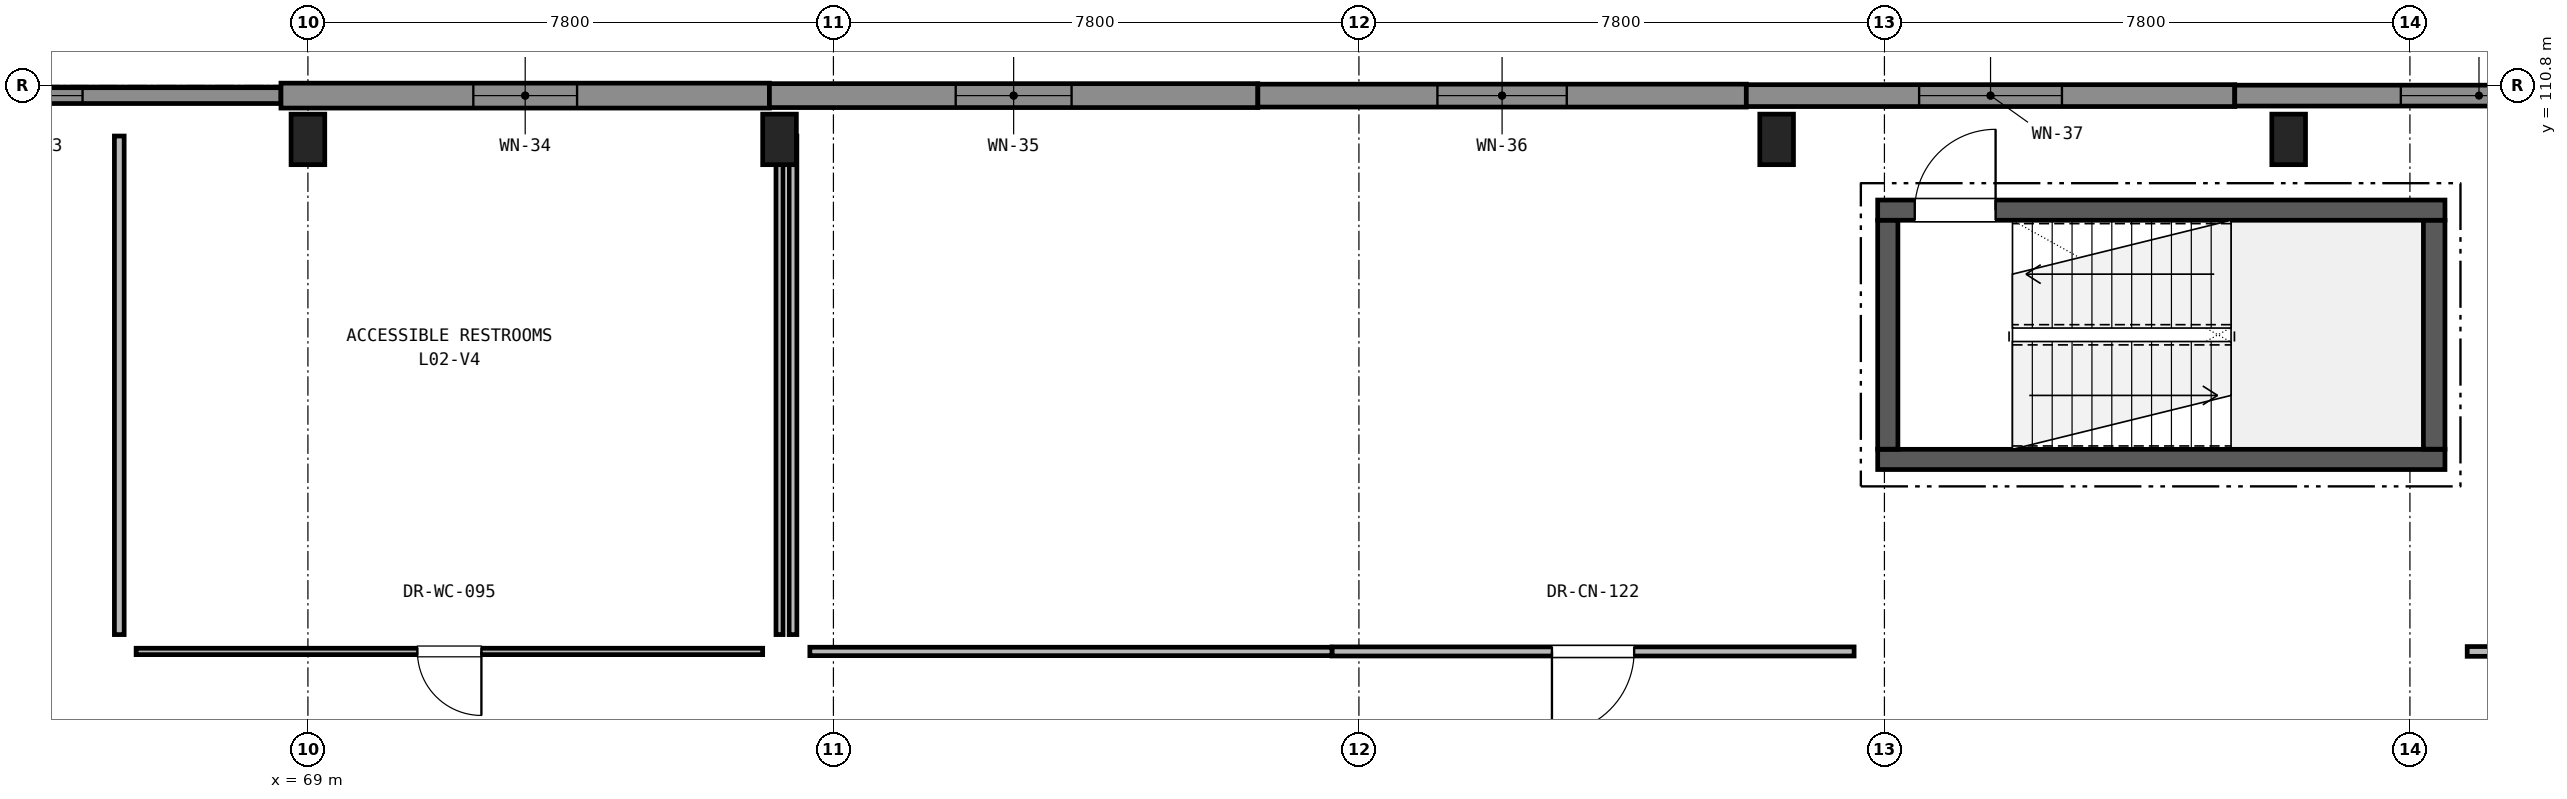
"""IFC4 building model, lengths in metres.
Left out: names, types, materials, properties, quantities, classifications, styles, units other than length and angle.
Written with IfcOpenShell. Run it as: python <this file> out.ifc"""

import sys

from ifc_helpers import new_model, si_unit, direction, frame, frame_2d, origin, origin_2d, place, context, subcontext, project, spatial, rectangle, extrude, element, fill, save


model = new_model("IFC4")
c1 = context("Model", 3, precision=1e-05, world=origin(), true_north=direction((0.0, 1.0)))
c2 = subcontext(c1, "Body", "Model", "MODEL_VIEW")
j1 = project(units=[si_unit("LENGTHUNIT", "METRE"), si_unit("PLANEANGLEUNIT", "RADIAN")], contexts=[c1])
p1 = place(None, origin())
s1 = spatial("IfcSite", under=j1, at=p1, CompositionType="ELEMENT")
p2 = place(p1, origin())
s2 = spatial("IfcBuilding", under=s1, at=p2, CompositionType="ELEMENT")
p3 = place(p2, frame((0.0, 0.0, 9.52)))
s3 = spatial("IfcBuildingStorey", under=s2, at=p3, CompositionType="ELEMENT", Elevation=9.52)
for number, where, z_axis, x_axis in (
    (1, (69.0, 110.0, 0.0), (0.0, 0.0, 1.0), (1.0, 0.0, 0.0)),
    (2, (76.0, 110.0, 0.0), (0.0, 0.0, 1.0), (1.0, 0.0, 0.0)),
    (3, (90.8, 110.0, 0.0), (0.0, 0.0, 1.0), (1.0, 0.0, 0.0)),
    (4, (98.4, 110.0, 0.0), (0.0, 0.0, 1.0), (1.0, 0.0, 0.0)),
):
    element("IfcColumn", number, at=place(p3, frame(where, z_axis=z_axis, x_axis=x_axis)), inside=s3, PredefinedType="COLUMN", context=c2, shape_type="SweptSolid", body=[
        extrude(rectangle(XDim=0.5, YDim=0.75, at=origin_2d()), origin(), (0.0, 0.0, 1.0), 4.08),
    ])
p4 = place(p3, frame((61.35, 110.65, 0.0), z_axis=(0.0, 0.0, 1.0), x_axis=(1.0, 0.0, 0.0)))
e5 = element("IfcWall", 5, at=p4, inside=s3, PredefinedType="SOLIDWALL", context=c2, shape_type="SweptSolid", body=[
    extrude(rectangle(XDim=7.25, YDim=0.235, at=frame_2d((3.625, 0.0))), origin(), (0.0, 0.0, 1.0), 3.82),
])
p5 = place(p4, frame((2.945, 0.0, 0.9)))
e6 = element("IfcOpeningElement", 6, at=p5, cuts=e5, PredefinedType="OPENING", context=c2, shape_type="SweptSolid", body=[
    extrude(rectangle(XDim=1.36, YDim=1.62, at=frame_2d((0.68, 0.81))), frame((0.0, 0.127, 0.0), z_axis=(0.0, -1.0, 0.0), x_axis=(1.0, 0.0, 0.0)), (0.0, 0.0, 1.0), 0.255),
])
p6 = place(p3, frame((68.6, 110.65, 0.0), z_axis=(0.0, 0.0, 1.0), x_axis=(1.0, 0.0, 0.0)))
e7 = element("IfcWall", 7, at=p6, inside=s3, PredefinedType="SOLIDWALL", context=c2, shape_type="SweptSolid", body=[
    extrude(rectangle(XDim=7.25, YDim=0.37, at=frame_2d((3.625, 0.0))), origin(), (0.0, 0.0, 1.0), 3.82),
])
p7 = place(p6, frame((2.855, 0.0, 0.9)))
e8 = element("IfcOpeningElement", 8, at=p7, cuts=e7, PredefinedType="OPENING", context=c2, shape_type="SweptSolid", body=[
    extrude(rectangle(XDim=1.54, YDim=1.62, at=frame_2d((0.77, 0.81))), frame((0.0, 0.195, 0.0), z_axis=(0.0, -1.0, 0.0), x_axis=(1.0, 0.0, 0.0)), (0.0, 0.0, 1.0), 0.39),
])
p8 = place(p3, frame((75.85, 110.65, 0.0), z_axis=(0.0, 0.0, 1.0), x_axis=(1.0, 0.0, 0.0)))
e9 = element("IfcWall", 9, at=p8, inside=s3, PredefinedType="SOLIDWALL", context=c2, shape_type="SweptSolid", body=[
    extrude(rectangle(XDim=7.25, YDim=0.355, at=frame_2d((3.625, 0.0))), origin(), (0.0, 0.0, 1.0), 3.82),
])
p9 = place(p8, frame((2.765, 0.0, 0.9)))
e10 = element("IfcOpeningElement", 10, at=p9, cuts=e9, PredefinedType="OPENING", context=c2, shape_type="SweptSolid", body=[
    extrude(rectangle(XDim=1.72, YDim=1.62, at=frame_2d((0.86, 0.81))), frame((0.0, 0.188, 0.0), z_axis=(0.0, -1.0, 0.0), x_axis=(1.0, 0.0, 0.0)), (0.0, 0.0, 1.0), 0.375),
])
p10 = place(p3, frame((83.1, 110.65, 0.0), z_axis=(0.0, 0.0, 1.0), x_axis=(1.0, 0.0, 0.0)))
e11 = element("IfcWall", 11, at=p10, inside=s3, PredefinedType="SOLIDWALL", context=c2, shape_type="SweptSolid", body=[
    extrude(rectangle(XDim=7.25, YDim=0.34, at=frame_2d((3.625, 0.0))), origin(), (0.0, 0.0, 1.0), 3.82),
])
p11 = place(p10, frame((2.665, 0.0, 0.9)))
e12 = element("IfcOpeningElement", 12, at=p11, cuts=e11, PredefinedType="OPENING", context=c2, shape_type="SweptSolid", body=[
    extrude(rectangle(XDim=1.92, YDim=1.62, at=frame_2d((0.96, 0.81))), frame((0.0, 0.18, 0.0), z_axis=(0.0, -1.0, 0.0), x_axis=(1.0, 0.0, 0.0)), (0.0, 0.0, 1.0), 0.36),
])
p12 = place(p3, frame((90.35, 110.65, 0.0), z_axis=(0.0, 0.0, 1.0), x_axis=(1.0, 0.0, 0.0)))
e13 = element("IfcWall", 13, at=p12, inside=s3, PredefinedType="SOLIDWALL", context=c2, shape_type="SweptSolid", body=[
    extrude(rectangle(XDim=7.25, YDim=0.325, at=frame_2d((3.625, 0.0))), origin(), (0.0, 0.0, 1.0), 3.82),
])
p13 = place(p12, frame((2.565, 0.0, 0.9)))
e14 = element("IfcOpeningElement", 14, at=p13, cuts=e13, PredefinedType="OPENING", context=c2, shape_type="SweptSolid", body=[
    extrude(rectangle(XDim=2.12, YDim=1.62, at=frame_2d((1.06, 0.81))), frame((0.0, 0.172, 0.0), z_axis=(0.0, -1.0, 0.0), x_axis=(1.0, 0.0, 0.0)), (0.0, 0.0, 1.0), 0.345),
])
p14 = place(p3, frame((97.6, 110.65, 0.0), z_axis=(0.0, 0.0, 1.0), x_axis=(1.0, 0.0, 0.0)))
e15 = element("IfcWall", 15, at=p14, inside=s3, PredefinedType="SOLIDWALL", context=c2, shape_type="SweptSolid", body=[
    extrude(rectangle(XDim=7.25, YDim=0.31, at=frame_2d((3.625, 0.0))), origin(), (0.0, 0.0, 1.0), 3.82),
])
p15 = place(p14, frame((2.465, 0.0, 0.9)))
e16 = element("IfcOpeningElement", 16, at=p15, cuts=e15, PredefinedType="OPENING", context=c2, shape_type="SweptSolid", body=[
    extrude(rectangle(XDim=2.32, YDim=1.62, at=frame_2d((1.16, 0.81))), frame((0.0, 0.165, 0.0), z_axis=(0.0, -1.0, 0.0), x_axis=(1.0, 0.0, 0.0)), (0.0, 0.0, 1.0), 0.33),
])
p16 = place(p3, frame((92.3, 105.25, 0.0), z_axis=(0.0, 0.0, 1.0), x_axis=(1.0, 0.0, 0.0)))
e17 = element("IfcWall", 17, at=p16, inside=s3, PredefinedType="SHEAR", context=c2, shape_type="SweptSolid", body=[
    extrude(rectangle(XDim=8.42, YDim=0.3, at=frame_2d((4.21, 0.0))), origin(), (0.0, 0.0, 1.0), 3.82),
])
p17 = place(p3, frame((92.3, 108.95, 0.0), z_axis=(0.0, 0.0, 1.0), x_axis=(1.0, 0.0, 0.0)))
e18 = element("IfcWall", 18, at=p17, inside=s3, PredefinedType="SHEAR", context=c2, shape_type="SweptSolid", body=[
    extrude(rectangle(XDim=8.42, YDim=0.3, at=frame_2d((4.21, 0.0))), origin(), (0.0, 0.0, 1.0), 3.82),
])
p18 = place(p17, frame((0.55, 0.0, 0.0)))
e19 = element("IfcOpeningElement", 19, at=p18, cuts=e18, PredefinedType="OPENING", context=c2, shape_type="SweptSolid", body=[
    extrude(rectangle(XDim=1.2, YDim=2.2, at=frame_2d((0.6, 1.1))), frame((0.0, 0.16, 0.0), z_axis=(0.0, -1.0, 0.0), x_axis=(1.0, 0.0, 0.0)), (0.0, 0.0, 1.0), 0.32),
])
p19 = place(p3, frame((92.45, 105.402, 0.0), z_axis=(0.0, 0.0, 1.0), x_axis=(0.0, 1.0, 0.0)))
e20 = element("IfcWall", 20, at=p19, inside=s3, PredefinedType="SHEAR", context=c2, shape_type="SweptSolid", body=[
    extrude(rectangle(XDim=3.396, YDim=0.3, at=frame_2d((1.698, 0.0))), origin(), (0.0, 0.0, 1.0), 3.82),
])
p20 = place(p3, frame((100.56, 105.402, 0.0), z_axis=(0.0, 0.0, 1.0), x_axis=(0.0, 1.0, 0.0)))
e21 = element("IfcWall", 21, at=p20, inside=s3, PredefinedType="SHEAR", context=c2, shape_type="SweptSolid", body=[
    extrude(rectangle(XDim=3.396, YDim=0.32, at=frame_2d((1.698, 0.0))), origin(), (0.0, 0.0, 1.0), 3.82),
])
p21 = place(p3, frame((76.0, 110.05, 0.0), z_axis=(0.0, 0.0, 1.0), x_axis=(0.0, -1.0, 0.0)))
e22 = element("IfcWall", 22, at=p21, inside=s3, PredefinedType="PARTITIONING", context=c2, shape_type="SweptSolid", body=[
    extrude(rectangle(XDim=7.4, YDim=0.105, at=frame_2d((3.7, 0.0))), origin(), (0.0, 0.0, 1.0), 3.17),
])
p22 = place(p3, frame((75.75, 102.4, 0.0), z_axis=(0.0, 0.0, 1.0), x_axis=(-1.0, 0.0, 0.0)))
e23 = element("IfcWall", 23, at=p22, inside=s3, PredefinedType="PARTITIONING", context=c2, shape_type="SweptSolid", body=[
    extrude(rectangle(XDim=9.3, YDim=0.095, at=frame_2d((4.65, 0.0))), origin(), (0.0, 0.0, 1.0), 3.07),
])
p23 = place(p22, frame((4.175, 0.0, 0.0)))
e24 = element("IfcOpeningElement", 24, at=p23, cuts=e23, PredefinedType="OPENING", context=c2, shape_type="SweptSolid", body=[
    extrude(rectangle(XDim=0.95, YDim=2.15, at=frame_2d((0.475, 1.075))), frame((0.0, 0.057, 0.0), z_axis=(0.0, -1.0, 0.0), x_axis=(1.0, 0.0, 0.0)), (0.0, 0.0, 1.0), 0.115),
])
p24 = place(p3, frame((66.2, 102.65, 0.0), z_axis=(0.0, 0.0, 1.0), x_axis=(0.0, 1.0, 0.0)))
e25 = element("IfcWall", 25, at=p24, inside=s3, PredefinedType="PARTITIONING", context=c2, shape_type="SweptSolid", body=[
    extrude(rectangle(XDim=7.4, YDim=0.145, at=frame_2d((3.7, 0.0))), origin(), (0.0, 0.0, 1.0), 3.27),
])
p25 = place(p3, frame((91.95, 102.4, 0.0), z_axis=(0.0, 0.0, 1.0), x_axis=(-1.0, 0.0, 0.0)))
e26 = element("IfcWall", 26, at=p25, inside=s3, PredefinedType="PARTITIONING", context=c2, shape_type="SweptSolid", body=[
    extrude(rectangle(XDim=7.75, YDim=0.135, at=frame_2d((3.875, 0.0))), origin(), (0.0, 0.0, 1.0), 3.27),
])
p26 = place(p25, frame((3.265, 0.0, 0.0)))
e27 = element("IfcOpeningElement", 27, at=p26, cuts=e26, PredefinedType="OPENING", context=c2, shape_type="SweptSolid", body=[
    extrude(rectangle(XDim=1.22, YDim=2.2, at=frame_2d((0.61, 1.1))), frame((0.0, 0.077, 0.0), z_axis=(0.0, -1.0, 0.0), x_axis=(1.0, 0.0, 0.0)), (0.0, 0.0, 1.0), 0.155),
])
p27 = place(p3, frame((84.2, 102.4, 0.0), z_axis=(0.0, 0.0, 1.0), x_axis=(-1.0, 0.0, 0.0)))
e28 = element("IfcWall", 28, at=p27, inside=s3, PredefinedType="PARTITIONING", context=c2, shape_type="SweptSolid", body=[
    extrude(rectangle(XDim=7.75, YDim=0.125, at=frame_2d((3.875, 0.0))), origin(), (0.0, 0.0, 1.0), 3.82),
])
p28 = place(p3, frame((76.2, 102.65, 0.0), z_axis=(0.0, 0.0, 1.0), x_axis=(0.0, 1.0, 0.0)))
e29 = element("IfcWall", 29, at=p28, inside=s3, PredefinedType="PARTITIONING", context=c2, shape_type="SweptSolid", body=[
    extrude(rectangle(XDim=7.4, YDim=0.115, at=frame_2d((3.7, 0.0))), origin(), (0.0, 0.0, 1.0), 3.17),
])
p29 = place(p3, frame((106.483, 102.4, 0.0), z_axis=(0.0, 0.0, 1.0), x_axis=(-1.0, 0.0, 0.0)))
e30 = element("IfcWall", 30, at=p29, inside=s3, PredefinedType="PARTITIONING", context=c2, shape_type="SweptSolid", body=[
    extrude(rectangle(XDim=5.433, YDim=0.145, at=frame_2d((2.716, 0.0))), origin(), (0.0, 0.0, 1.0), 3.22),
])
p30 = place(p5, origin())
e31 = element("IfcWindow", 31, at=p30, inside=s3, PartitioningType="SINGLE_PANEL", PredefinedType="WINDOW", context=c2, shape_type="SweptSolid", body=[
    extrude(rectangle(XDim=1.36, YDim=1.62, at=frame_2d((0.68, 0.81))), frame((0.0, 0.03, 0.0), z_axis=(0.0, -1.0, 0.0), x_axis=(1.0, 0.0, 0.0)), (0.0, 0.0, 1.0), 0.06),
])
fill(e6, e31)
p31 = place(p7, origin())
e32 = element("IfcWindow", 32, at=p31, inside=s3, PartitioningType="SINGLE_PANEL", PredefinedType="WINDOW", context=c2, shape_type="SweptSolid", body=[
    extrude(rectangle(XDim=1.54, YDim=1.62, at=frame_2d((0.77, 0.81))), frame((0.0, 0.03, 0.0), z_axis=(0.0, -1.0, 0.0), x_axis=(1.0, 0.0, 0.0)), (0.0, 0.0, 1.0), 0.06),
])
fill(e8, e32)
p32 = place(p9, origin())
e33 = element("IfcWindow", 33, at=p32, inside=s3, PartitioningType="SINGLE_PANEL", PredefinedType="WINDOW", context=c2, shape_type="SweptSolid", body=[
    extrude(rectangle(XDim=1.72, YDim=1.62, at=frame_2d((0.86, 0.81))), frame((0.0, 0.03, 0.0), z_axis=(0.0, -1.0, 0.0), x_axis=(1.0, 0.0, 0.0)), (0.0, 0.0, 1.0), 0.06),
])
fill(e10, e33)
p33 = place(p11, origin())
e34 = element("IfcWindow", 34, at=p33, inside=s3, PartitioningType="SINGLE_PANEL", PredefinedType="WINDOW", context=c2, shape_type="SweptSolid", body=[
    extrude(rectangle(XDim=1.92, YDim=1.62, at=frame_2d((0.96, 0.81))), frame((0.0, 0.03, 0.0), z_axis=(0.0, -1.0, 0.0), x_axis=(1.0, 0.0, 0.0)), (0.0, 0.0, 1.0), 0.06),
])
fill(e12, e34)
p34 = place(p13, origin())
e35 = element("IfcWindow", 35, at=p34, inside=s3, PartitioningType="SINGLE_PANEL", PredefinedType="WINDOW", context=c2, shape_type="SweptSolid", body=[
    extrude(rectangle(XDim=2.12, YDim=1.62, at=frame_2d((1.06, 0.81))), frame((0.0, 0.03, 0.0), z_axis=(0.0, -1.0, 0.0), x_axis=(1.0, 0.0, 0.0)), (0.0, 0.0, 1.0), 0.06),
])
fill(e14, e35)
p35 = place(p15, origin())
e36 = element("IfcWindow", 36, at=p35, inside=s3, PartitioningType="SINGLE_PANEL", PredefinedType="WINDOW", context=c2, shape_type="SweptSolid", body=[
    extrude(rectangle(XDim=2.32, YDim=1.62, at=frame_2d((1.16, 0.81))), frame((0.0, 0.03, 0.0), z_axis=(0.0, -1.0, 0.0), x_axis=(1.0, 0.0, 0.0)), (0.0, 0.0, 1.0), 0.06),
])
fill(e16, e36)
p36 = place(p18, origin())
e37 = element("IfcDoor", 37, at=p36, inside=s3, OperationType="SINGLE_SWING_RIGHT", PredefinedType="DOOR", context=c2, shape_type="SweptSolid", body=[
    extrude(rectangle(XDim=1.2, YDim=2.2, at=frame_2d((0.6, 1.1))), frame((0.0, 0.025, 0.0), z_axis=(0.0, -1.0, 0.0), x_axis=(1.0, 0.0, 0.0)), (0.0, 0.0, 1.0), 0.05),
])
fill(e19, e37)
p37 = place(p23, origin())
e38 = element("IfcDoor", 38, at=p37, inside=s3, OperationType="SINGLE_SWING_LEFT", PredefinedType="DOOR", context=c2, shape_type="SweptSolid", body=[
    extrude(rectangle(XDim=0.95, YDim=2.15, at=frame_2d((0.475, 1.075))), frame((0.0, 0.025, 0.0), z_axis=(0.0, -1.0, 0.0), x_axis=(1.0, 0.0, 0.0)), (0.0, 0.0, 1.0), 0.05),
])
fill(e24, e38)
p38 = place(p26, origin())
e39 = element("IfcDoor", 39, at=p38, inside=s3, OperationType="SINGLE_SWING_RIGHT", PredefinedType="DOOR", context=c2, shape_type="SweptSolid", body=[
    extrude(rectangle(XDim=1.22, YDim=2.2, at=frame_2d((0.61, 1.1))), frame((0.0, 0.025, 0.0), z_axis=(0.0, -1.0, 0.0), x_axis=(1.0, 0.0, 0.0)), (0.0, 0.0, 1.0), 0.05),
])
fill(e27, e39)
save(model, sys.argv[1])
